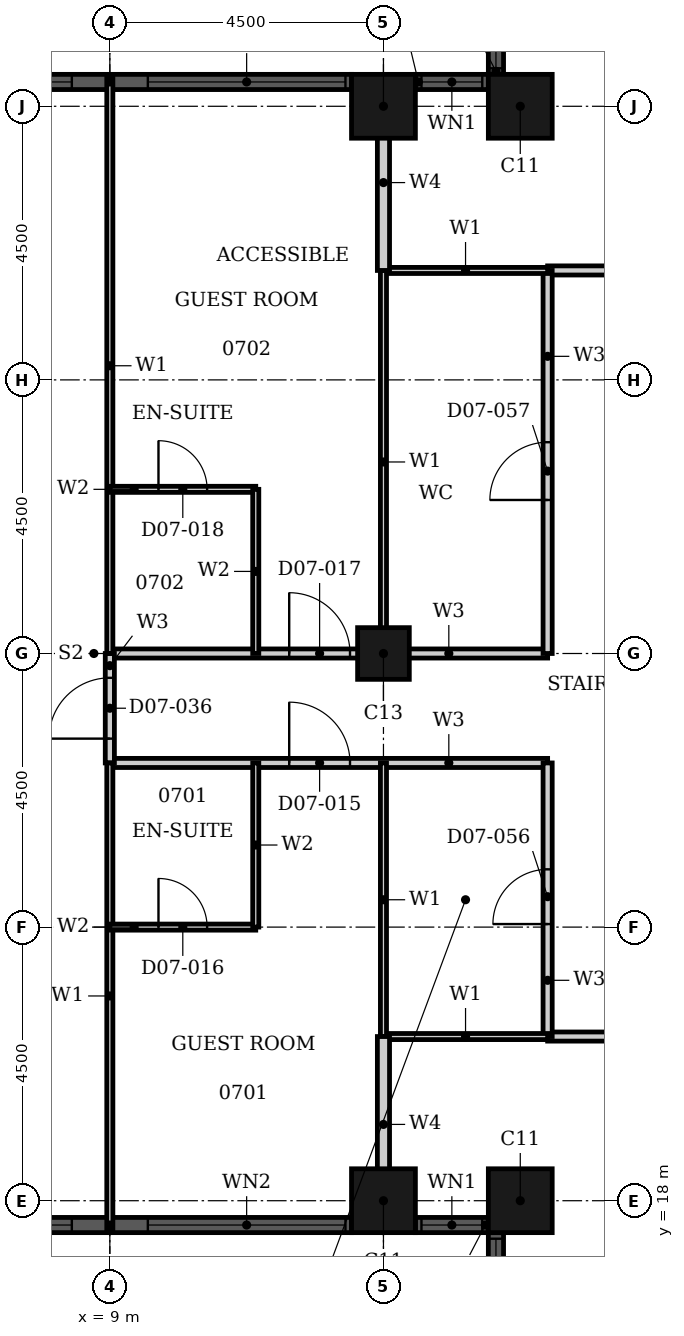
"""IFC4 building model, lengths in metres.
Left out: names, types, materials, properties, quantities, classifications, styles, units other than length and angle.
Written with IfcOpenShell. Run it as: python <this file> out.ifc"""

import sys

from ifc_helpers import new_model, si_unit, direction, frame, frame_2d, origin, origin_2d, place, context, subcontext, project, spatial, rectangle, hollow_rectangle, extrude, element, fill, save


model = new_model("IFC4")
c1 = context("Model", 3, precision=1e-05, world=origin(), true_north=direction((0.0, 1.0)))
c2 = subcontext(c1, "Body", "Model", "MODEL_VIEW")
j1 = project(units=[si_unit("LENGTHUNIT", "METRE"), si_unit("PLANEANGLEUNIT", "RADIAN")], contexts=[c1])
p1 = place(None, origin())
s1 = spatial("IfcSite", under=j1, at=p1, CompositionType="ELEMENT")
p2 = place(p1, origin())
s2 = spatial("IfcBuilding", under=s1, at=p2, CompositionType="ELEMENT")
p3 = place(p2, frame((0.0, 0.0, 37.2)))
s3 = spatial("IfcBuildingStorey", under=s2, at=p3, CompositionType="ELEMENT", Elevation=37.2)
for number, where, z_axis, x_axis in (
    (1, (15.75, 36.0, 0.0), (0.0, 0.0, 1.0), (1.0, 0.0, 0.0)),
    (2, (13.5, 36.0, 0.0), (0.0, 0.0, 1.0), (1.0, 0.0, 0.0)),
    (3, (13.5, 18.0, 0.0), (0.0, 0.0, 1.0), (1.0, 0.0, 0.0)),
    (4, (15.75, 18.0, 0.0), (0.0, 0.0, 1.0), (1.0, 0.0, 0.0)),
):
    element("IfcColumn", number, at=place(p3, frame(where, z_axis=z_axis, x_axis=x_axis)), inside=s3, PredefinedType="COLUMN", context=c2, shape_type="SweptSolid", body=[
        extrude(hollow_rectangle(XDim=1.05, YDim=1.05, WallThickness=0.034, at=origin_2d()), origin(), (0.0, 0.0, 1.0), 3.6),
    ])
p4 = place(p3, frame((13.5, 27.0, 0.0), z_axis=(0.0, 0.0, 1.0), x_axis=(1.0, 0.0, 0.0)))
e5 = element("IfcColumn", 5, at=p4, inside=s3, PredefinedType="COLUMN", context=c2, shape_type="SweptSolid", body=[
    extrude(hollow_rectangle(XDim=0.85, YDim=0.85, WallThickness=0.026, at=origin_2d()), origin(), (0.0, 0.0, 1.0), 3.6),
])
p5 = place(p3, frame((15.35, 37.725, 0.0), z_axis=(0.0, 0.0, 1.0), x_axis=(0.0, -1.0, 0.0)))
e6 = element("IfcWall", 6, at=p5, inside=s3, PredefinedType="SOLIDWALL", context=c2, shape_type="SweptSolid", body=[
    extrude(rectangle(XDim=1.2, YDim=0.25, at=frame_2d((0.6, 0.0))), origin(), (0.0, 0.0, 1.0), 3.6),
])
p6 = place(p5, frame((0.1, 0.0, 0.9)))
e7 = element("IfcOpeningElement", 7, at=p6, cuts=e6, PredefinedType="OPENING", context=c2, shape_type="SweptSolid", body=[
    extrude(rectangle(XDim=1.0, YDim=2.08, at=frame_2d((0.5, 1.04))), frame((0.0, 0.135, 0.0), z_axis=(0.0, -1.0, 0.0), x_axis=(1.0, 0.0, 0.0)), (0.0, 0.0, 1.0), 0.27),
])
p7 = place(p3, frame((15.225, 36.4, 0.0), z_axis=(0.0, 0.0, 1.0), x_axis=(-1.0, 0.0, 0.0)))
e8 = element("IfcWall", 8, at=p7, inside=s3, PredefinedType="SOLIDWALL", context=c2, shape_type="SweptSolid", body=[
    extrude(rectangle(XDim=1.2, YDim=0.25, at=frame_2d((0.6, 0.0))), origin(), (0.0, 0.0, 1.0), 3.6),
])
p8 = place(p7, frame((0.1, 0.0, 0.9)))
e9 = element("IfcOpeningElement", 9, at=p8, cuts=e8, PredefinedType="OPENING", context=c2, shape_type="SweptSolid", body=[
    extrude(rectangle(XDim=1.0, YDim=2.08, at=frame_2d((0.5, 1.04))), frame((0.0, 0.135, 0.0), z_axis=(0.0, -1.0, 0.0), x_axis=(1.0, 0.0, 0.0)), (0.0, 0.0, 1.0), 0.27),
])
p9 = place(p3, frame((12.975, 36.4, 0.0), z_axis=(0.0, 0.0, 1.0), x_axis=(-1.0, 0.0, 0.0)))
e10 = element("IfcWall", 10, at=p9, inside=s3, PredefinedType="SOLIDWALL", context=c2, shape_type="SweptSolid", body=[
    extrude(rectangle(XDim=7.95, YDim=0.25, at=frame_2d((3.975, 0.0))), origin(), (0.0, 0.0, 1.0), 3.6),
])
p10 = place(p9, frame((0.1, 0.0, 0.9)))
e11 = element("IfcOpeningElement", 11, at=p10, cuts=e10, PredefinedType="OPENING", context=c2, shape_type="SweptSolid", body=[
    extrude(rectangle(XDim=3.25, YDim=2.08, at=frame_2d((1.625, 1.04))), frame((0.0, 0.135, 0.0), z_axis=(0.0, -1.0, 0.0), x_axis=(1.0, 0.0, 0.0)), (0.0, 0.0, 1.0), 0.27),
])
p11 = place(p9, frame((4.6, 0.0, 0.9)))
e12 = element("IfcOpeningElement", 12, at=p11, cuts=e10, PredefinedType="OPENING", context=c2, shape_type="SweptSolid", body=[
    extrude(rectangle(XDim=3.25, YDim=2.08, at=frame_2d((1.625, 1.04))), frame((0.0, 0.135, 0.0), z_axis=(0.0, -1.0, 0.0), x_axis=(1.0, 0.0, 0.0)), (0.0, 0.0, 1.0), 0.27),
])
p12 = place(p3, frame((5.025, 17.6, 0.0), z_axis=(0.0, 0.0, 1.0), x_axis=(1.0, 0.0, 0.0)))
e13 = element("IfcWall", 13, at=p12, inside=s3, PredefinedType="SOLIDWALL", context=c2, shape_type="SweptSolid", body=[
    extrude(rectangle(XDim=7.95, YDim=0.25, at=frame_2d((3.975, 0.0))), origin(), (0.0, 0.0, 1.0), 3.6),
])
p13 = place(p12, frame((0.1, 0.0, 0.9)))
e14 = element("IfcOpeningElement", 14, at=p13, cuts=e13, PredefinedType="OPENING", context=c2, shape_type="SweptSolid", body=[
    extrude(rectangle(XDim=3.25, YDim=2.08, at=frame_2d((1.625, 1.04))), frame((0.0, 0.135, 0.0), z_axis=(0.0, -1.0, 0.0), x_axis=(1.0, 0.0, 0.0)), (0.0, 0.0, 1.0), 0.27),
])
p14 = place(p12, frame((4.6, 0.0, 0.9)))
e15 = element("IfcOpeningElement", 15, at=p14, cuts=e13, PredefinedType="OPENING", context=c2, shape_type="SweptSolid", body=[
    extrude(rectangle(XDim=3.25, YDim=2.08, at=frame_2d((1.625, 1.04))), frame((0.0, 0.135, 0.0), z_axis=(0.0, -1.0, 0.0), x_axis=(1.0, 0.0, 0.0)), (0.0, 0.0, 1.0), 0.27),
])
p15 = place(p3, frame((14.025, 17.6, 0.0), z_axis=(0.0, 0.0, 1.0), x_axis=(1.0, 0.0, 0.0)))
e16 = element("IfcWall", 16, at=p15, inside=s3, PredefinedType="SOLIDWALL", context=c2, shape_type="SweptSolid", body=[
    extrude(rectangle(XDim=1.2, YDim=0.25, at=frame_2d((0.6, 0.0))), origin(), (0.0, 0.0, 1.0), 3.6),
])
p16 = place(p15, frame((0.1, 0.0, 0.9)))
e17 = element("IfcOpeningElement", 17, at=p16, cuts=e16, PredefinedType="OPENING", context=c2, shape_type="SweptSolid", body=[
    extrude(rectangle(XDim=1.0, YDim=2.08, at=frame_2d((0.5, 1.04))), frame((0.0, 0.135, 0.0), z_axis=(0.0, -1.0, 0.0), x_axis=(1.0, 0.0, 0.0)), (0.0, 0.0, 1.0), 0.27),
])
p17 = place(p3, frame((15.35, 17.475, 0.0), z_axis=(0.0, 0.0, 1.0), x_axis=(0.0, -1.0, 0.0)))
e18 = element("IfcWall", 18, at=p17, inside=s3, PredefinedType="SOLIDWALL", context=c2, shape_type="SweptSolid", body=[
    extrude(rectangle(XDim=1.2, YDim=0.25, at=frame_2d((0.6, 0.0))), origin(), (0.0, 0.0, 1.0), 3.6),
])
p18 = place(p17, frame((0.1, 0.0, 0.9)))
e19 = element("IfcOpeningElement", 19, at=p18, cuts=e18, PredefinedType="OPENING", context=c2, shape_type="SweptSolid", body=[
    extrude(rectangle(XDim=1.0, YDim=2.08, at=frame_2d((0.5, 1.04))), frame((0.0, 0.135, 0.0), z_axis=(0.0, -1.0, 0.0), x_axis=(1.0, 0.0, 0.0)), (0.0, 0.0, 1.0), 0.27),
])
p19 = place(p3, frame((16.2, 20.7, 0.0), z_axis=(0.0, 0.0, 1.0), x_axis=(1.0, 0.0, 0.0)))
e20 = element("IfcWall", 20, at=p19, inside=s3, PredefinedType="PARTITIONING", context=c2, shape_type="SweptSolid", body=[
    extrude(rectangle(XDim=9.3, YDim=0.15, at=frame_2d((4.65, 0.0))), origin(), (0.0, 0.0, 1.0), 3.3),
])
p20 = place(p19, frame((4.75, 0.0, 0.0)))
e21 = element("IfcOpeningElement", 21, at=p20, cuts=e20, PredefinedType="OPENING", context=c2, shape_type="SweptSolid", body=[
    extrude(rectangle(XDim=1.0, YDim=2.1, at=frame_2d((0.5, 1.05))), frame((0.0, 0.085, 0.0), z_axis=(0.0, -1.0, 0.0), x_axis=(1.0, 0.0, 0.0)), (0.0, 0.0, 1.0), 0.17),
])
p21 = place(p19, frame((7.35, 0.0, 0.0)))
e22 = element("IfcOpeningElement", 22, at=p21, cuts=e20, PredefinedType="OPENING", context=c2, shape_type="SweptSolid", body=[
    extrude(rectangle(XDim=0.9, YDim=2.1, at=frame_2d((0.45, 1.05))), frame((0.0, 0.085, 0.0), z_axis=(0.0, -1.0, 0.0), x_axis=(1.0, 0.0, 0.0)), (0.0, 0.0, 1.0), 0.17),
])
p22 = place(p3, frame((9.0, 25.2, 0.0), z_axis=(0.0, 0.0, 1.0), x_axis=(1.0, 0.0, 0.0)))
e23 = element("IfcWall", 23, at=p22, inside=s3, PredefinedType="PARTITIONING", context=c2, shape_type="SweptSolid", body=[
    extrude(rectangle(XDim=7.2, YDim=0.15, at=frame_2d((3.6, 0.0))), origin(), (0.0, 0.0, 1.0), 3.3),
])
p23 = place(p22, frame((2.95, 0.0, 0.0)))
e24 = element("IfcOpeningElement", 24, at=p23, cuts=e23, PredefinedType="OPENING", context=c2, shape_type="SweptSolid", body=[
    extrude(rectangle(XDim=1.0, YDim=2.1, at=frame_2d((0.5, 1.05))), frame((0.0, 0.085, 0.0), z_axis=(0.0, -1.0, 0.0), x_axis=(1.0, 0.0, 0.0)), (0.0, 0.0, 1.0), 0.17),
])
p24 = place(p3, frame((9.0, 27.0, 0.0), z_axis=(0.0, 0.0, 1.0), x_axis=(1.0, 0.0, 0.0)))
e25 = element("IfcWall", 25, at=p24, inside=s3, PredefinedType="PARTITIONING", context=c2, shape_type="SweptSolid", body=[
    extrude(rectangle(XDim=7.2, YDim=0.15, at=frame_2d((3.6, 0.0))), origin(), (0.0, 0.0, 1.0), 2.58),
])
p25 = place(p24, frame((2.95, 0.0, 0.0)))
e26 = element("IfcOpeningElement", 26, at=p25, cuts=e25, PredefinedType="OPENING", context=c2, shape_type="SweptSolid", body=[
    extrude(rectangle(XDim=1.0, YDim=2.1, at=frame_2d((0.5, 1.05))), frame((0.0, 0.085, 0.0), z_axis=(0.0, -1.0, 0.0), x_axis=(1.0, 0.0, 0.0)), (0.0, 0.0, 1.0), 0.17),
])
p26 = place(p3, frame((16.2, 33.3, 0.0), z_axis=(0.0, 0.0, 1.0), x_axis=(1.0, 0.0, 0.0)))
e27 = element("IfcWall", 27, at=p26, inside=s3, PredefinedType="PARTITIONING", context=c2, shape_type="SweptSolid", body=[
    extrude(rectangle(XDim=15.3, YDim=0.15, at=frame_2d((7.65, 0.0))), origin(), (0.0, 0.0, 1.0), 3.3),
])
p27 = place(p26, frame((4.75, 0.0, 0.0)))
e28 = element("IfcOpeningElement", 28, at=p27, cuts=e27, PredefinedType="OPENING", context=c2, shape_type="SweptSolid", body=[
    extrude(rectangle(XDim=1.0, YDim=2.1, at=frame_2d((0.5, 1.05))), frame((0.0, 0.085, 0.0), z_axis=(0.0, -1.0, 0.0), x_axis=(1.0, 0.0, 0.0)), (0.0, 0.0, 1.0), 0.17),
])
p28 = place(p26, frame((10.35, 0.0, 0.0)))
e29 = element("IfcOpeningElement", 29, at=p28, cuts=e27, PredefinedType="OPENING", context=c2, shape_type="SweptSolid", body=[
    extrude(rectangle(XDim=0.9, YDim=2.1, at=frame_2d((0.45, 1.05))), frame((0.0, 0.085, 0.0), z_axis=(0.0, -1.0, 0.0), x_axis=(1.0, 0.0, 0.0)), (0.0, 0.0, 1.0), 0.17),
])
p29 = place(p3, frame((16.2, 27.0, 0.0), z_axis=(0.0, 0.0, 1.0), x_axis=(0.0, 1.0, 0.0)))
e30 = element("IfcWall", 30, at=p29, inside=s3, PredefinedType="PARTITIONING", context=c2, shape_type="SweptSolid", body=[
    extrude(rectangle(XDim=6.3, YDim=0.15, at=frame_2d((3.15, 0.0))), origin(), (0.0, 0.0, 1.0), 3.3),
])
p30 = place(p29, frame((2.525, 0.0, 0.0)))
e31 = element("IfcOpeningElement", 31, at=p30, cuts=e30, PredefinedType="OPENING", context=c2, shape_type="SweptSolid", body=[
    extrude(rectangle(XDim=0.95, YDim=2.1, at=frame_2d((0.475, 1.05))), frame((0.0, 0.085, 0.0), z_axis=(0.0, -1.0, 0.0), x_axis=(1.0, 0.0, 0.0)), (0.0, 0.0, 1.0), 0.17),
])
p31 = place(p3, frame((16.2, 20.7, 0.0), z_axis=(0.0, 0.0, 1.0), x_axis=(0.0, 1.0, 0.0)))
e32 = element("IfcWall", 32, at=p31, inside=s3, PredefinedType="PARTITIONING", context=c2, shape_type="SweptSolid", body=[
    extrude(rectangle(XDim=4.5, YDim=0.15, at=frame_2d((2.25, 0.0))), origin(), (0.0, 0.0, 1.0), 3.3),
])
p32 = place(p31, frame((1.85, 0.0, 0.0)))
e33 = element("IfcOpeningElement", 33, at=p32, cuts=e32, PredefinedType="OPENING", context=c2, shape_type="SweptSolid", body=[
    extrude(rectangle(XDim=0.9, YDim=2.1, at=frame_2d((0.45, 1.05))), frame((0.0, 0.085, 0.0), z_axis=(0.0, -1.0, 0.0), x_axis=(1.0, 0.0, 0.0)), (0.0, 0.0, 1.0), 0.17),
])
p33 = place(p3, frame((9.0, 25.2, 0.0), z_axis=(0.0, 0.0, 1.0), x_axis=(0.0, 1.0, 0.0)))
e34 = element("IfcWall", 34, at=p33, inside=s3, PredefinedType="PARTITIONING", context=c2, shape_type="SweptSolid", body=[
    extrude(rectangle(XDim=1.8, YDim=0.15, at=frame_2d((0.9, 0.0))), origin(), (0.0, 0.0, 1.0), 3.3),
])
p34 = place(p33, frame((0.4, 0.0, 0.0)))
e35 = element("IfcOpeningElement", 35, at=p34, cuts=e34, PredefinedType="OPENING", context=c2, shape_type="SweptSolid", body=[
    extrude(rectangle(XDim=1.0, YDim=2.1, at=frame_2d((0.5, 1.05))), frame((0.0, 0.085, 0.0), z_axis=(0.0, -1.0, 0.0), x_axis=(1.0, 0.0, 0.0)), (0.0, 0.0, 1.0), 0.17),
])
for number, where, z_axis, x_axis in (
    (36, (13.5, 20.7, 0.0), (0.0, 0.0, 1.0), (1.0, 0.0, 0.0)),
    (37, (13.5, 33.3, 0.0), (0.0, 0.0, 1.0), (1.0, 0.0, 0.0)),
):
    element("IfcWall", number, at=place(p3, frame(where, z_axis=z_axis, x_axis=x_axis)), inside=s3, PredefinedType="PARTITIONING", context=c2, shape_type="SweptSolid", body=[
        extrude(rectangle(XDim=2.7, YDim=0.1, at=frame_2d((1.35, 0.0))), origin(), (0.0, 0.0, 1.0), 3.3),
    ])
p35 = place(p3, frame((13.5, 27.0, 0.0), z_axis=(0.0, 0.0, 1.0), x_axis=(0.0, 1.0, 0.0)))
e38 = element("IfcWall", 38, at=p35, inside=s3, PredefinedType="PARTITIONING", context=c2, shape_type="SweptSolid", body=[
    extrude(rectangle(XDim=6.3, YDim=0.1, at=frame_2d((3.15, 0.0))), origin(), (0.0, 0.0, 1.0), 2.38),
])
p36 = place(p3, frame((13.5, 20.7, 0.0), z_axis=(0.0, 0.0, 1.0), x_axis=(0.0, 1.0, 0.0)))
e39 = element("IfcWall", 39, at=p36, inside=s3, PredefinedType="PARTITIONING", context=c2, shape_type="SweptSolid", body=[
    extrude(rectangle(XDim=4.5, YDim=0.1, at=frame_2d((2.25, 0.0))), origin(), (0.0, 0.0, 1.0), 2.38),
])
p37 = place(p3, frame((9.0, 27.0, 0.0), z_axis=(0.0, 0.0, 1.0), x_axis=(0.0, 1.0, 0.0)))
e40 = element("IfcWall", 40, at=p37, inside=s3, PredefinedType="PARTITIONING", context=c2, shape_type="SweptSolid", body=[
    extrude(rectangle(XDim=9.465, YDim=0.1, at=frame_2d((4.732, 0.0))), origin(), (0.0, 0.0, 1.0), 3.3),
])
p38 = place(p3, frame((9.0, 17.535, 0.0), z_axis=(0.0, 0.0, 1.0), x_axis=(0.0, 1.0, 0.0)))
e41 = element("IfcWall", 41, at=p38, inside=s3, PredefinedType="PARTITIONING", context=c2, shape_type="SweptSolid", body=[
    extrude(rectangle(XDim=7.665, YDim=0.1, at=frame_2d((3.833, 0.0))), origin(), (0.0, 0.0, 1.0), 3.3),
])
for number, where, z_axis, x_axis in (
    (42, (13.5, 33.3, 0.0), (0.0, 0.0, 1.0), (0.0, 1.0, 0.0)),
    (43, (13.5, 17.81, 0.0), (0.0, 0.0, 1.0), (0.0, 1.0, 0.0)),
):
    element("IfcWall", number, at=place(p3, frame(where, z_axis=z_axis, x_axis=x_axis)), inside=s3, PredefinedType="PARTITIONING", context=c2, shape_type="SweptSolid", body=[
        extrude(rectangle(XDim=2.89, YDim=0.2, at=frame_2d((1.445, 0.0))), origin(), (0.0, 0.0, 1.0), 2.38),
    ])
p39 = place(p3, frame((9.0, 22.5, 0.0), z_axis=(0.0, 0.0, 1.0), x_axis=(1.0, 0.0, 0.0)))
e44 = element("IfcWall", 44, at=p39, inside=s3, PredefinedType="PARTITIONING", context=c2, shape_type="SweptSolid", body=[
    extrude(rectangle(XDim=2.4, YDim=0.1, at=frame_2d((1.2, 0.0))), origin(), (0.0, 0.0, 1.0), 2.58),
])
p40 = place(p39, frame((0.8, 0.0, 0.0)))
e45 = element("IfcOpeningElement", 45, at=p40, cuts=e44, PredefinedType="OPENING", context=c2, shape_type="SweptSolid", body=[
    extrude(rectangle(XDim=0.8, YDim=2.1, at=frame_2d((0.4, 1.05))), frame((0.0, 0.06, 0.0), z_axis=(0.0, -1.0, 0.0), x_axis=(1.0, 0.0, 0.0)), (0.0, 0.0, 1.0), 0.12),
])
p41 = place(p3, frame((9.0, 29.7, 0.0), z_axis=(0.0, 0.0, 1.0), x_axis=(1.0, 0.0, 0.0)))
e46 = element("IfcWall", 46, at=p41, inside=s3, PredefinedType="PARTITIONING", context=c2, shape_type="SweptSolid", body=[
    extrude(rectangle(XDim=2.4, YDim=0.1, at=frame_2d((1.2, 0.0))), origin(), (0.0, 0.0, 1.0), 3.3),
])
p42 = place(p41, frame((0.8, 0.0, 0.0)))
e47 = element("IfcOpeningElement", 47, at=p42, cuts=e46, PredefinedType="OPENING", context=c2, shape_type="SweptSolid", body=[
    extrude(rectangle(XDim=0.8, YDim=2.1, at=frame_2d((0.4, 1.05))), frame((0.0, 0.06, 0.0), z_axis=(0.0, -1.0, 0.0), x_axis=(1.0, 0.0, 0.0)), (0.0, 0.0, 1.0), 0.12),
])
for number, where, z_axis, x_axis in (
    (48, (11.4, 27.0, 0.0), (0.0, 0.0, 1.0), (0.0, 1.0, 0.0)),
    (49, (11.4, 22.5, 0.0), (0.0, 0.0, 1.0), (0.0, 1.0, 0.0)),
):
    element("IfcWall", number, at=place(p3, frame(where, z_axis=z_axis, x_axis=x_axis)), inside=s3, PredefinedType="PARTITIONING", context=c2, shape_type="SweptSolid", body=[
        extrude(rectangle(XDim=2.7, YDim=0.1, at=frame_2d((1.35, 0.0))), origin(), (0.0, 0.0, 1.0), 3.3),
    ])
p43 = place(p6, origin())
e50 = element("IfcWindow", 50, at=p43, inside=s3, PartitioningType="SINGLE_PANEL", PredefinedType="WINDOW", context=c2, shape_type="SweptSolid", body=[
    extrude(rectangle(XDim=1.0, YDim=2.08, at=frame_2d((0.5, 1.04))), frame((0.0, 0.03, 0.0), z_axis=(0.0, -1.0, 0.0), x_axis=(1.0, 0.0, 0.0)), (0.0, 0.0, 1.0), 0.06),
])
fill(e7, e50)
p44 = place(p8, origin())
e51 = element("IfcWindow", 51, at=p44, inside=s3, PartitioningType="SINGLE_PANEL", PredefinedType="WINDOW", context=c2, shape_type="SweptSolid", body=[
    extrude(rectangle(XDim=1.0, YDim=2.08, at=frame_2d((0.5, 1.04))), frame((0.0, 0.03, 0.0), z_axis=(0.0, -1.0, 0.0), x_axis=(1.0, 0.0, 0.0)), (0.0, 0.0, 1.0), 0.06),
])
fill(e9, e51)
p45 = place(p10, origin())
e52 = element("IfcWindow", 52, at=p45, inside=s3, PartitioningType="SINGLE_PANEL", PredefinedType="WINDOW", context=c2, shape_type="SweptSolid", body=[
    extrude(rectangle(XDim=3.25, YDim=2.08, at=frame_2d((1.625, 1.04))), frame((0.0, 0.03, 0.0), z_axis=(0.0, -1.0, 0.0), x_axis=(1.0, 0.0, 0.0)), (0.0, 0.0, 1.0), 0.06),
])
fill(e11, e52)
p46 = place(p11, origin())
e53 = element("IfcWindow", 53, at=p46, inside=s3, PartitioningType="SINGLE_PANEL", PredefinedType="WINDOW", context=c2, shape_type="SweptSolid", body=[
    extrude(rectangle(XDim=3.25, YDim=2.08, at=frame_2d((1.625, 1.04))), frame((0.0, 0.03, 0.0), z_axis=(0.0, -1.0, 0.0), x_axis=(1.0, 0.0, 0.0)), (0.0, 0.0, 1.0), 0.06),
])
fill(e12, e53)
p47 = place(p13, origin())
e54 = element("IfcWindow", 54, at=p47, inside=s3, PartitioningType="SINGLE_PANEL", PredefinedType="WINDOW", context=c2, shape_type="SweptSolid", body=[
    extrude(rectangle(XDim=3.25, YDim=2.08, at=frame_2d((1.625, 1.04))), frame((0.0, 0.03, 0.0), z_axis=(0.0, -1.0, 0.0), x_axis=(1.0, 0.0, 0.0)), (0.0, 0.0, 1.0), 0.06),
])
fill(e14, e54)
p48 = place(p14, origin())
e55 = element("IfcWindow", 55, at=p48, inside=s3, PartitioningType="SINGLE_PANEL", PredefinedType="WINDOW", context=c2, shape_type="SweptSolid", body=[
    extrude(rectangle(XDim=3.25, YDim=2.08, at=frame_2d((1.625, 1.04))), frame((0.0, 0.03, 0.0), z_axis=(0.0, -1.0, 0.0), x_axis=(1.0, 0.0, 0.0)), (0.0, 0.0, 1.0), 0.06),
])
fill(e15, e55)
p49 = place(p16, origin())
e56 = element("IfcWindow", 56, at=p49, inside=s3, PartitioningType="SINGLE_PANEL", PredefinedType="WINDOW", context=c2, shape_type="SweptSolid", body=[
    extrude(rectangle(XDim=1.0, YDim=2.08, at=frame_2d((0.5, 1.04))), frame((0.0, 0.03, 0.0), z_axis=(0.0, -1.0, 0.0), x_axis=(1.0, 0.0, 0.0)), (0.0, 0.0, 1.0), 0.06),
])
fill(e17, e56)
p50 = place(p18, origin())
e57 = element("IfcWindow", 57, at=p50, inside=s3, PartitioningType="SINGLE_PANEL", PredefinedType="WINDOW", context=c2, shape_type="SweptSolid", body=[
    extrude(rectangle(XDim=1.0, YDim=2.08, at=frame_2d((0.5, 1.04))), frame((0.0, 0.03, 0.0), z_axis=(0.0, -1.0, 0.0), x_axis=(1.0, 0.0, 0.0)), (0.0, 0.0, 1.0), 0.06),
])
fill(e19, e57)
p51 = place(p23, origin())
e58 = element("IfcDoor", 58, at=p51, inside=s3, OperationType="SINGLE_SWING_RIGHT", PredefinedType="DOOR", context=c2, shape_type="SweptSolid", body=[
    extrude(rectangle(XDim=1.0, YDim=2.1, at=frame_2d((0.5, 1.05))), frame((0.0, 0.025, 0.0), z_axis=(0.0, -1.0, 0.0), x_axis=(1.0, 0.0, 0.0)), (0.0, 0.0, 1.0), 0.05),
])
fill(e24, e58)
p52 = place(p40, origin())
e59 = element("IfcDoor", 59, at=p52, inside=s3, OperationType="SINGLE_SWING_RIGHT", PredefinedType="DOOR", context=c2, shape_type="SweptSolid", body=[
    extrude(rectangle(XDim=0.8, YDim=2.1, at=frame_2d((0.4, 1.05))), frame((0.0, 0.025, 0.0), z_axis=(0.0, -1.0, 0.0), x_axis=(1.0, 0.0, 0.0)), (0.0, 0.0, 1.0), 0.05),
])
fill(e45, e59)
p53 = place(p25, origin())
e60 = element("IfcDoor", 60, at=p53, inside=s3, OperationType="SINGLE_SWING_RIGHT", PredefinedType="DOOR", context=c2, shape_type="SweptSolid", body=[
    extrude(rectangle(XDim=1.0, YDim=2.1, at=frame_2d((0.5, 1.05))), frame((0.0, 0.025, 0.0), z_axis=(0.0, -1.0, 0.0), x_axis=(1.0, 0.0, 0.0)), (0.0, 0.0, 1.0), 0.05),
])
fill(e26, e60)
p54 = place(p42, origin())
e61 = element("IfcDoor", 61, at=p54, inside=s3, OperationType="SINGLE_SWING_RIGHT", PredefinedType="DOOR", context=c2, shape_type="SweptSolid", body=[
    extrude(rectangle(XDim=0.8, YDim=2.1, at=frame_2d((0.4, 1.05))), frame((0.0, 0.025, 0.0), z_axis=(0.0, -1.0, 0.0), x_axis=(1.0, 0.0, 0.0)), (0.0, 0.0, 1.0), 0.05),
])
fill(e47, e61)
p55 = place(p34, origin())
e62 = element("IfcDoor", 62, at=p55, inside=s3, OperationType="SINGLE_SWING_LEFT", PredefinedType="DOOR", context=c2, shape_type="SweptSolid", body=[
    extrude(rectangle(XDim=1.0, YDim=2.1, at=frame_2d((0.5, 1.05))), frame((0.0, 0.025, 0.0), z_axis=(0.0, -1.0, 0.0), x_axis=(1.0, 0.0, 0.0)), (0.0, 0.0, 1.0), 0.05),
])
fill(e35, e62)
p56 = place(p32, origin())
e63 = element("IfcDoor", 63, at=p56, inside=s3, OperationType="SINGLE_SWING_RIGHT", PredefinedType="DOOR", context=c2, shape_type="SweptSolid", body=[
    extrude(rectangle(XDim=0.9, YDim=2.1, at=frame_2d((0.45, 1.05))), frame((0.0, 0.025, 0.0), z_axis=(0.0, -1.0, 0.0), x_axis=(1.0, 0.0, 0.0)), (0.0, 0.0, 1.0), 0.05),
])
fill(e33, e63)
p57 = place(p30, origin())
e64 = element("IfcDoor", 64, at=p57, inside=s3, OperationType="SINGLE_SWING_LEFT", PredefinedType="DOOR", context=c2, shape_type="SweptSolid", body=[
    extrude(rectangle(XDim=0.95, YDim=2.1, at=frame_2d((0.475, 1.05))), frame((0.0, 0.025, 0.0), z_axis=(0.0, -1.0, 0.0), x_axis=(1.0, 0.0, 0.0)), (0.0, 0.0, 1.0), 0.05),
])
fill(e31, e64)
save(model, sys.argv[1])
